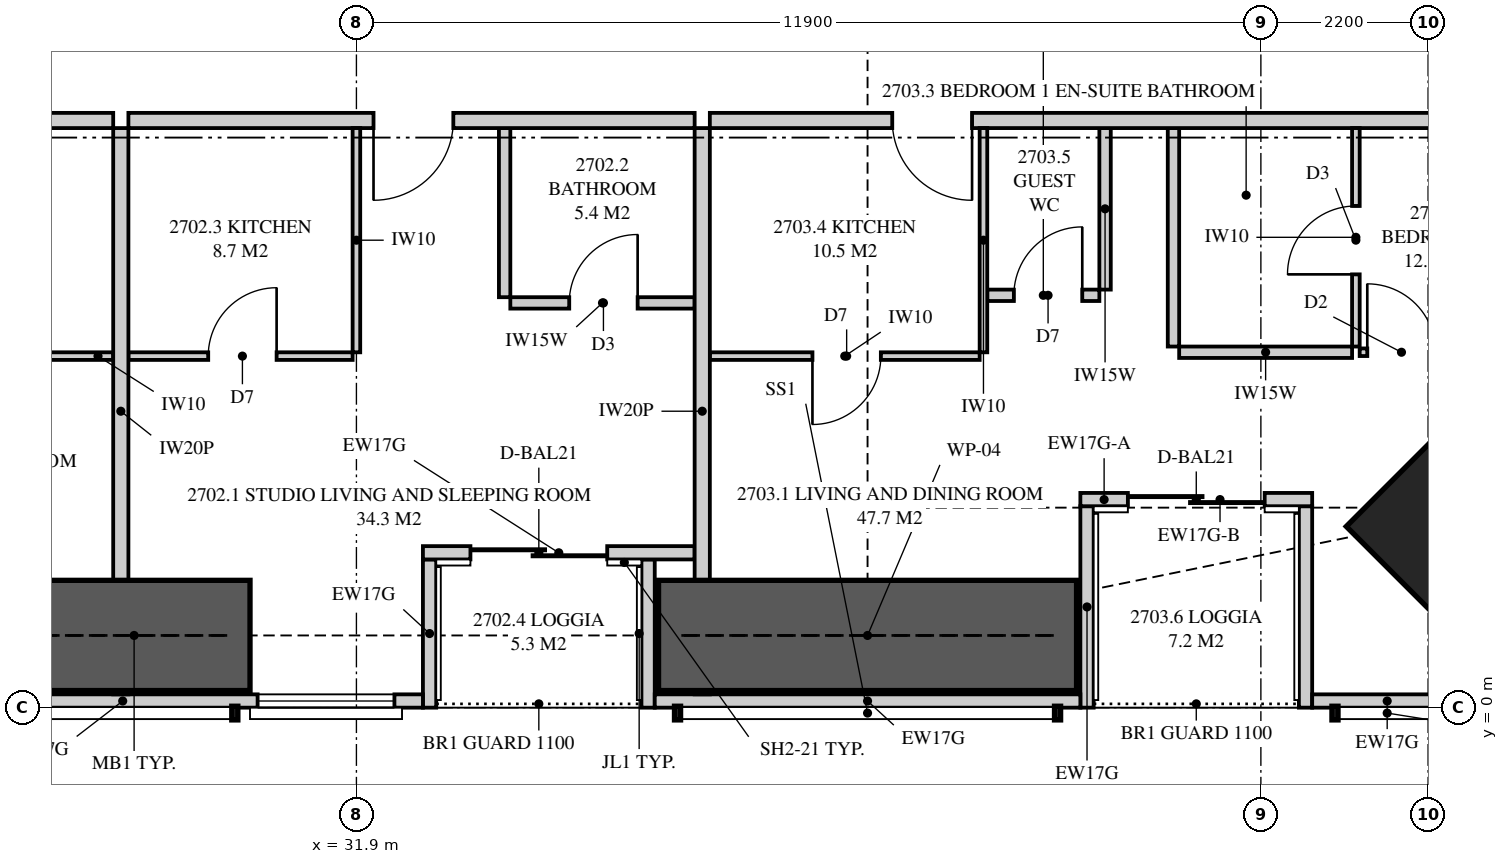
"""IFC4 building model, lengths in metres.
Left out: names, types, materials, properties, quantities, classifications, styles, units other than length and angle.
Written with IfcOpenShell. Run it as: python <this file> out.ifc"""

import sys

from ifc_helpers import new_model, si_unit, direction, frame, frame_2d, origin, origin_2d, place, context, subcontext, project, spatial, polyline, rectangle, outline, extrude, element, fill, save


model = new_model("IFC4")
c1 = context("Model", 3, precision=1e-05, world=origin(), true_north=direction((0.0, 1.0)))
c2 = subcontext(c1, "Body", "Model", "MODEL_VIEW")
j1 = project(units=[si_unit("LENGTHUNIT", "METRE"), si_unit("PLANEANGLEUNIT", "RADIAN")], contexts=[c1])
p1 = place(None, origin())
s1 = spatial("IfcSite", under=j1, at=p1, CompositionType="ELEMENT")
p2 = place(p1, origin())
s2 = spatial("IfcBuilding", under=s1, at=p2, CompositionType="ELEMENT")
p3 = place(p2, frame((0.0, 0.0, 101.5)))
s3 = spatial("IfcBuildingStorey", under=s2, at=p3, CompositionType="ELEMENT", Elevation=101.5)
p4 = place(p3, frame((46.869, 2.631, 0.0), z_axis=(0.0, 0.0, 1.0), x_axis=(-0.707106781187, 0.707106781187, 0.0)))
e1 = element("IfcColumn", 1, at=p4, inside=s3, PredefinedType="COLUMN", context=c2, shape_type="SweptSolid", body=[
    extrude(rectangle(XDim=2.4, YDim=3.1, at=origin_2d()), origin(), (0.0, 0.0, 1.0), 3.35),
])
p5 = place(p3, frame((24.875, 0.087, 0.0), z_axis=(0.0, 0.0, 1.0), x_axis=(1.0, 0.0, 0.0)))
e2 = element("IfcWall", 2, at=p5, inside=s3, PredefinedType="SOLIDWALL", context=c2, shape_type="SweptSolid", body=[
    extrude(rectangle(XDim=7.9, YDim=0.175, at=frame_2d((3.95, 0.0))), origin(), (0.0, 0.0, 1.0), 2.15),
])
p6 = place(p5, frame((5.725, 0.0, 0.4)))
e3 = element("IfcOpeningElement", 3, at=p6, cuts=e2, PredefinedType="OPENING", context=c2, shape_type="SweptSolid", body=[
    extrude(rectangle(XDim=1.8, YDim=1.7, at=frame_2d((0.9, 0.85))), frame((0.0, 0.097, 0.0), z_axis=(0.0, -1.0, 0.0), x_axis=(1.0, 0.0, 0.0)), (0.0, 0.0, 1.0), 0.195),
])
p7 = place(p3, frame((35.825, 0.087, 0.0), z_axis=(0.0, 0.0, 1.0), x_axis=(1.0, 0.0, 0.0)))
e4 = element("IfcWall", 4, at=p7, inside=s3, PredefinedType="SOLIDWALL", context=c2, shape_type="SweptSolid", body=[
    extrude(outline(polyline([(0.0, 0.0), (5.6, 0.0), (5.6, 3.11), (3.003, 3.11), (3.003, 2.15), (2.958, 2.15), (2.958, 3.11), (2.8, 3.11), (2.8, 2.15), (0.0, 2.15), (0.0, 0.0)])), frame((0.0, 0.087, 0.0), z_axis=(0.0, -1.0, 0.0), x_axis=(1.0, 0.0, 0.0)), (0.0, 0.0, 1.0), 0.175),
])
p8 = place(p3, frame((44.475, 0.087, 0.0), z_axis=(0.0, 0.0, 1.0), x_axis=(1.0, 0.0, 0.0)))
e5 = element("IfcWall", 5, at=p8, inside=s3, PredefinedType="SOLIDWALL", context=c2, shape_type="SweptSolid", body=[
    extrude(rectangle(XDim=1.974, YDim=0.175, at=frame_2d((0.987, 0.0))), origin(), (0.0, 0.0, 1.0), 3.11),
])
p9 = place(p3, frame((32.775, 2.038, 0.0), z_axis=(0.0, 0.0, 1.0), x_axis=(1.0, 0.0, 0.0)))
e6 = element("IfcWall", 6, at=p9, inside=s3, PredefinedType="SOLIDWALL", context=c2, shape_type="SweptSolid", body=[
    extrude(rectangle(XDim=3.575, YDim=0.175, at=frame_2d((1.788, 0.0))), origin(), (0.0, 0.0, 1.0), 3.11),
])
p10 = place(p9, frame((0.625, 0.0, 0.0)))
e7 = element("IfcOpeningElement", 7, at=p10, cuts=e6, PredefinedType="OPENING", context=c2, shape_type="SweptSolid", body=[
    extrude(rectangle(XDim=1.8, YDim=2.1, at=frame_2d((0.9, 1.05))), frame((0.0, 0.097, 0.0), z_axis=(0.0, -1.0, 0.0), x_axis=(1.0, 0.0, 0.0)), (0.0, 0.0, 1.0), 0.195),
])
for number, where, z_axis, x_axis in (
    (8, (32.863, 0.0, 0.0), (0.0, 0.0, 1.0), (0.0, 1.0, 0.0)),
    (9, (35.738, 0.0, 0.0), (0.0, 0.0, 1.0), (0.0, 1.0, 0.0)),
):
    element("IfcWall", number, at=place(p3, frame(where, z_axis=z_axis, x_axis=x_axis)), inside=s3, PredefinedType="SOLIDWALL", context=c2, shape_type="SweptSolid", body=[
        extrude(outline(polyline([(0.0, 0.0), (1.95, 0.0), (1.95, 3.11), (1.75, 3.11), (1.75, 2.15), (0.15, 2.15), (0.15, 3.11), (0.0, 3.11), (0.0, 0.0)])), frame((0.0, 0.087, 0.0), z_axis=(0.0, -1.0, 0.0), x_axis=(1.0, 0.0, 0.0)), (0.0, 0.0, 1.0), 0.175),
    ])
p11 = place(p3, frame((41.425, 2.738, 0.0), z_axis=(0.0, 0.0, 1.0), x_axis=(1.0, 0.0, 0.0)))
e10 = element("IfcWall", 10, at=p11, inside=s3, PredefinedType="SOLIDWALL", context=c2, shape_type="SweptSolid", body=[
    extrude(rectangle(XDim=0.625, YDim=0.175, at=frame_2d((0.312, 0.0))), origin(), (0.0, 0.0, 1.0), 2.51),
])
p12 = place(p3, frame((42.05, 2.738, 0.0), z_axis=(0.0, 0.0, 1.0), x_axis=(1.0, 0.0, 0.0)))
e11 = element("IfcWall", 11, at=p12, inside=s3, PredefinedType="SOLIDWALL", context=c2, shape_type="SweptSolid", body=[
    extrude(rectangle(XDim=2.425, YDim=0.175, at=frame_2d((1.212, 0.0))), origin(), (0.0, 0.0, 1.0), 2.15),
])
p13 = place(p12, origin())
e12 = element("IfcOpeningElement", 12, at=p13, cuts=e11, PredefinedType="OPENING", context=c2, shape_type="SweptSolid", body=[
    extrude(rectangle(XDim=1.8, YDim=2.1, at=frame_2d((0.9, 1.05))), frame((0.0, 0.097, 0.0), z_axis=(0.0, -1.0, 0.0), x_axis=(1.0, 0.0, 0.0)), (0.0, 0.0, 1.0), 0.195),
])
p14 = place(p3, frame((41.512, 0.0, 0.0), z_axis=(0.0, 0.0, 1.0), x_axis=(0.0, 1.0, 0.0)))
e13 = element("IfcWall", 13, at=p14, inside=s3, PredefinedType="SOLIDWALL", context=c2, shape_type="SweptSolid", body=[
    extrude(outline(polyline([(0.0, 0.0), (2.65, 0.0), (2.65, 2.51), (2.373, 2.51), (2.373, 2.15), (0.705, 2.15), (0.705, 3.11), (0.0, 3.11), (0.0, 0.0)])), frame((0.0, 0.087, 0.0), z_axis=(0.0, -1.0, 0.0), x_axis=(1.0, 0.0, 0.0)), (0.0, 0.0, 1.0), 0.175),
])
p15 = place(p3, frame((44.387, 0.0, 0.0), z_axis=(0.0, 0.0, 1.0), x_axis=(0.0, 1.0, 0.0)))
e14 = element("IfcWall", 14, at=p15, inside=s3, PredefinedType="SOLIDWALL", context=c2, shape_type="SweptSolid", body=[
    extrude(outline(polyline([(0.0, 0.0), (2.65, 0.0), (2.65, 2.15), (1.291, 2.15), (1.291, 3.11), (0.0, 3.11), (0.0, 0.0)])), frame((0.0, 0.087, 0.0), z_axis=(0.0, -1.0, 0.0), x_axis=(1.0, 0.0, 0.0)), (0.0, 0.0, 1.0), 0.175),
])
p16 = place(p3, frame((28.8, 0.175, 0.0), z_axis=(0.0, 0.0, 1.0), x_axis=(0.0, 1.0, 0.0)))
e15 = element("IfcWall", 15, at=p16, inside=s3, PredefinedType="PARTITIONING", context=c2, shape_type="SweptSolid", body=[
    extrude(outline(polyline([(0.529, 2.15), (0.0, 2.15), (0.0, 0.0), (0.529, 0.0), (0.529, 0.786), (1.021, 0.786), (1.021, 0.0), (7.45, 0.0), (7.45, 3.11), (1.685, 3.11), (1.685, 2.15), (1.021, 2.15), (1.021, 1.364), (0.529, 1.364), (0.529, 2.15)])), frame((0.0, 0.1, 0.0), z_axis=(0.0, -1.0, 0.0), x_axis=(1.0, 0.0, 0.0)), (0.0, 0.0, 1.0), 0.2),
])
p17 = place(p3, frame((25.15, 4.625, 0.0), z_axis=(0.0, 0.0, 1.0), x_axis=(1.0, 0.0, 0.0)))
e16 = element("IfcWall", 16, at=p17, inside=s3, PredefinedType="PARTITIONING", context=c2, shape_type="SweptSolid", body=[
    extrude(outline(polyline([(0.0, 0.0), (3.55, 0.0), (3.55, 3.11), (2.887, 3.11), (2.887, 2.541), (2.312, 2.541), (2.312, 3.11), (0.0, 3.11), (0.0, 0.0)])), frame((0.0, 0.05, 0.0), z_axis=(0.0, -1.0, 0.0), x_axis=(1.0, 0.0, 0.0)), (0.0, 0.0, 1.0), 0.1),
])
p18 = place(p17, frame((1.3, 0.0, 0.0)))
e17 = element("IfcOpeningElement", 17, at=p18, cuts=e16, PredefinedType="OPENING", context=c2, shape_type="SweptSolid", body=[
    extrude(rectangle(XDim=0.9, YDim=2.1, at=frame_2d((0.45, 1.05))), frame((0.0, 0.06, 0.0), z_axis=(0.0, -1.0, 0.0), x_axis=(1.0, 0.0, 0.0)), (0.0, 0.0, 1.0), 0.12),
])
p19 = place(p3, frame((36.45, 0.175, 0.0), z_axis=(0.0, 0.0, 1.0), x_axis=(0.0, 1.0, 0.0)))
e18 = element("IfcWall", 18, at=p19, inside=s3, PredefinedType="PARTITIONING", context=c2, shape_type="SweptSolid", body=[
    extrude(outline(polyline([(0.529, 2.15), (0.0, 2.15), (0.0, 0.0), (0.529, 0.0), (0.529, 0.017), (1.021, 0.017), (1.021, 0.0), (7.45, 0.0), (7.45, 3.11), (1.685, 3.11), (1.685, 2.15), (1.021, 2.15), (1.021, 2.133), (0.529, 2.133), (0.529, 2.15)])), frame((0.0, 0.1, 0.0), z_axis=(0.0, -1.0, 0.0), x_axis=(1.0, 0.0, 0.0)), (0.0, 0.0, 1.0), 0.2),
])
p20 = place(p3, frame((28.9, 7.725, 0.0), z_axis=(0.0, 0.0, 1.0), x_axis=(1.0, 0.0, 0.0)))
e19 = element("IfcWall", 19, at=p20, inside=s3, PredefinedType="PARTITIONING", context=c2, shape_type="SweptSolid", body=[
    extrude(rectangle(XDim=7.45, YDim=0.2, at=frame_2d((3.725, 0.0))), origin(), (0.0, 0.0, 1.0), 3.11),
])
p21 = place(p20, frame((3.225, 0.0, 0.0)))
e20 = element("IfcOpeningElement", 20, at=p21, cuts=e19, PredefinedType="OPENING", context=c2, shape_type="SweptSolid", body=[
    extrude(rectangle(XDim=1.05, YDim=2.2, at=frame_2d((0.525, 1.1))), frame((0.0, 0.11, 0.0), z_axis=(0.0, -1.0, 0.0), x_axis=(1.0, 0.0, 0.0)), (0.0, 0.0, 1.0), 0.22),
])
p22 = place(p3, frame((33.925, 5.325, 0.0), z_axis=(0.0, 0.0, 1.0), x_axis=(1.0, 0.0, 0.0)))
e21 = element("IfcWall", 21, at=p22, inside=s3, PredefinedType="PLUMBINGWALL", context=c2, shape_type="SweptSolid", body=[
    extrude(rectangle(XDim=2.425, YDim=0.15, at=frame_2d((1.212, 0.0))), origin(), (0.0, 0.0, 1.0), 3.11),
])
p23 = place(p22, frame((0.775, 0.0, 0.0)))
e22 = element("IfcOpeningElement", 22, at=p23, cuts=e21, PredefinedType="OPENING", context=c2, shape_type="SweptSolid", body=[
    extrude(rectangle(XDim=0.9, YDim=2.1, at=frame_2d((0.45, 1.05))), frame((0.0, 0.085, 0.0), z_axis=(0.0, -1.0, 0.0), x_axis=(1.0, 0.0, 0.0)), (0.0, 0.0, 1.0), 0.17),
])
p24 = place(p3, frame((33.85, 5.4, 0.0), z_axis=(0.0, 0.0, 1.0), x_axis=(0.0, 1.0, 0.0)))
e23 = element("IfcWall", 23, at=p24, inside=s3, PredefinedType="PLUMBINGWALL", context=c2, shape_type="SweptSolid", body=[
    extrude(rectangle(XDim=2.225, YDim=0.15, at=frame_2d((1.113, 0.0))), origin(), (0.0, 0.0, 1.0), 3.11),
])
p25 = place(p3, frame((28.9, 4.625, 0.0), z_axis=(0.0, 0.0, 1.0), x_axis=(1.0, 0.0, 0.0)))
e24 = element("IfcWall", 24, at=p25, inside=s3, PredefinedType="PARTITIONING", context=c2, shape_type="SweptSolid", body=[
    extrude(rectangle(XDim=2.95, YDim=0.1, at=frame_2d((1.475, 0.0))), origin(), (0.0, 0.0, 1.0), 3.11),
])
p26 = place(p25, frame((1.05, 0.0, 0.0)))
e25 = element("IfcOpeningElement", 25, at=p26, cuts=e24, PredefinedType="OPENING", context=c2, shape_type="SweptSolid", body=[
    extrude(rectangle(XDim=0.9, YDim=2.1, at=frame_2d((0.45, 1.05))), frame((0.0, 0.06, 0.0), z_axis=(0.0, -1.0, 0.0), x_axis=(1.0, 0.0, 0.0)), (0.0, 0.0, 1.0), 0.12),
])
p27 = place(p3, frame((31.9, 4.675, 0.0), z_axis=(0.0, 0.0, 1.0), x_axis=(0.0, 1.0, 0.0)))
e26 = element("IfcWall", 26, at=p27, inside=s3, PredefinedType="PARTITIONING", context=c2, shape_type="SweptSolid", body=[
    extrude(rectangle(XDim=2.95, YDim=0.1, at=frame_2d((1.475, 0.0))), origin(), (0.0, 0.0, 1.0), 3.11),
])
p28 = place(p3, frame((36.55, 7.725, 0.0), z_axis=(0.0, 0.0, 1.0), x_axis=(1.0, 0.0, 0.0)))
e27 = element("IfcWall", 27, at=p28, inside=s3, PredefinedType="PARTITIONING", context=c2, shape_type="SweptSolid", body=[
    extrude(outline(polyline([(0.0, 0.0), (9.475, 0.0), (9.475, 3.11), (2.412, 3.11), (2.412, 2.541), (1.738, 2.541), (1.738, 3.11), (0.0, 3.11), (0.0, 0.0)])), frame((0.0, 0.1, 0.0), z_axis=(0.0, -1.0, 0.0), x_axis=(1.0, 0.0, 0.0)), (0.0, 0.0, 1.0), 0.2),
])
p29 = place(p28, frame((2.4, 0.0, 0.0)))
e28 = element("IfcOpeningElement", 28, at=p29, cuts=e27, PredefinedType="OPENING", context=c2, shape_type="SweptSolid", body=[
    extrude(rectangle(XDim=1.05, YDim=2.2, at=frame_2d((0.525, 1.1))), frame((0.0, 0.11, 0.0), z_axis=(0.0, -1.0, 0.0), x_axis=(1.0, 0.0, 0.0)), (0.0, 0.0, 1.0), 0.22),
])
p30 = place(p3, frame((45.05, 4.751, 0.0), z_axis=(0.0, 0.0, 1.0), x_axis=(0.0, 1.0, 0.0)))
e29 = element("IfcWall", 29, at=p30, inside=s3, PredefinedType="PARTITIONING", context=c2, shape_type="SweptSolid", body=[
    extrude(rectangle(XDim=2.874, YDim=0.1, at=frame_2d((1.437, 0.0))), origin(), (0.0, 0.0, 1.0), 3.11),
])
p31 = place(p30, frame((0.949, 0.0, 0.0)))
e30 = element("IfcOpeningElement", 30, at=p31, cuts=e29, PredefinedType="OPENING", context=c2, shape_type="SweptSolid", body=[
    extrude(rectangle(XDim=0.9, YDim=2.1, at=frame_2d((0.45, 1.05))), frame((0.0, 0.06, 0.0), z_axis=(0.0, -1.0, 0.0), x_axis=(1.0, 0.0, 0.0)), (0.0, 0.0, 1.0), 0.12),
])
p32 = place(p3, frame((45.1, 4.676, 0.0), z_axis=(0.0, 0.0, 1.0), x_axis=(1.0, 0.0, 0.0)))
e31 = element("IfcWall", 31, at=p32, inside=s3, PredefinedType="PARTITIONING", context=c2, shape_type="SweptSolid", body=[
    extrude(outline(polyline([(0.0, 0.0), (4.4, 0.0), (4.4, 3.11), (2.971, 3.11), (2.971, 2.15), (1.229, 2.15), (1.229, 3.11), (0.0, 3.11), (0.0, 0.0)])), frame((0.0, 0.05, 0.0), z_axis=(0.0, -1.0, 0.0), x_axis=(1.0, 0.0, 0.0)), (0.0, 0.0, 1.0), 0.1),
])
p33 = place(p32, frame((0.1, 0.0, 0.0)))
e32 = element("IfcOpeningElement", 32, at=p33, cuts=e31, PredefinedType="OPENING", context=c2, shape_type="SweptSolid", body=[
    extrude(rectangle(XDim=0.9, YDim=2.1, at=frame_2d((0.45, 1.05))), frame((0.0, 0.06, 0.0), z_axis=(0.0, -1.0, 0.0), x_axis=(1.0, 0.0, 0.0)), (0.0, 0.0, 1.0), 0.12),
])
p34 = place(p3, frame((42.725, 4.676, 0.0), z_axis=(0.0, 0.0, 1.0), x_axis=(1.0, 0.0, 0.0)))
e33 = element("IfcWall", 33, at=p34, inside=s3, PredefinedType="PLUMBINGWALL", context=c2, shape_type="SweptSolid", body=[
    extrude(rectangle(XDim=2.275, YDim=0.15, at=frame_2d((1.137, 0.0))), origin(), (0.0, 0.0, 1.0), 3.11),
])
p35 = place(p3, frame((42.65, 4.751, 0.0), z_axis=(0.0, 0.0, 1.0), x_axis=(0.0, 1.0, 0.0)))
e34 = element("IfcWall", 34, at=p35, inside=s3, PredefinedType="PLUMBINGWALL", context=c2, shape_type="SweptSolid", body=[
    extrude(rectangle(XDim=2.874, YDim=0.15, at=frame_2d((1.437, 0.0))), origin(), (0.0, 0.0, 1.0), 3.11),
])
p36 = place(p3, frame((36.55, 4.625, 0.0), z_axis=(0.0, 0.0, 1.0), x_axis=(1.0, 0.0, 0.0)))
e35 = element("IfcWall", 35, at=p36, inside=s3, PredefinedType="PARTITIONING", context=c2, shape_type="SweptSolid", body=[
    extrude(outline(polyline([(0.0, 0.0), (3.55, 0.0), (3.55, 3.11), (2.362, 3.11), (2.362, 2.541), (1.788, 2.541), (1.788, 3.11), (0.0, 3.11), (0.0, 0.0)])), frame((0.0, 0.05, 0.0), z_axis=(0.0, -1.0, 0.0), x_axis=(1.0, 0.0, 0.0)), (0.0, 0.0, 1.0), 0.1),
])
p37 = place(p36, frame((1.35, 0.0, 0.0)))
e36 = element("IfcOpeningElement", 36, at=p37, cuts=e35, PredefinedType="OPENING", context=c2, shape_type="SweptSolid", body=[
    extrude(rectangle(XDim=0.9, YDim=2.1, at=frame_2d((0.45, 1.05))), frame((0.0, 0.06, 0.0), z_axis=(0.0, -1.0, 0.0), x_axis=(1.0, 0.0, 0.0)), (0.0, 0.0, 1.0), 0.12),
])
p38 = place(p3, frame((40.15, 4.675, 0.0), z_axis=(0.0, 0.0, 1.0), x_axis=(0.0, 1.0, 0.0)))
e37 = element("IfcWall", 37, at=p38, inside=s3, PredefinedType="PARTITIONING", context=c2, shape_type="SweptSolid", body=[
    extrude(rectangle(XDim=2.95, YDim=0.1, at=frame_2d((1.475, 0.0))), origin(), (0.0, 0.0, 1.0), 3.11),
])
p39 = place(p3, frame((40.2, 5.425, 0.0), z_axis=(0.0, 0.0, 1.0), x_axis=(1.0, 0.0, 0.0)))
e38 = element("IfcWall", 38, at=p39, inside=s3, PredefinedType="PLUMBINGWALL", context=c2, shape_type="SweptSolid", body=[
    extrude(rectangle(XDim=1.475, YDim=0.15, at=frame_2d((0.738, 0.0))), origin(), (0.0, 0.0, 1.0), 3.11),
])
p40 = place(p39, frame((0.35, 0.0, 0.0)))
e39 = element("IfcOpeningElement", 39, at=p40, cuts=e38, PredefinedType="OPENING", context=c2, shape_type="SweptSolid", body=[
    extrude(rectangle(XDim=0.9, YDim=2.1, at=frame_2d((0.45, 1.05))), frame((0.0, 0.085, 0.0), z_axis=(0.0, -1.0, 0.0), x_axis=(1.0, 0.0, 0.0)), (0.0, 0.0, 1.0), 0.17),
])
p41 = place(p3, frame((41.75, 5.5, 0.0), z_axis=(0.0, 0.0, 1.0), x_axis=(0.0, 1.0, 0.0)))
e40 = element("IfcWall", 40, at=p41, inside=s3, PredefinedType="PLUMBINGWALL", context=c2, shape_type="SweptSolid", body=[
    extrude(rectangle(XDim=2.125, YDim=0.15, at=frame_2d((1.062, 0.0))), origin(), (0.0, 0.0, 1.0), 3.11),
])
p42 = place(p3, frame((24.9, 7.725, 0.0), z_axis=(0.0, 0.0, 1.0), x_axis=(1.0, 0.0, 0.0)))
e41 = element("IfcWall", 41, at=p42, inside=s3, PredefinedType="PARTITIONING", context=c2, shape_type="SweptSolid", body=[
    extrude(outline(polyline([(0.0, 0.0), (3.8, 0.0), (3.8, 3.11), (3.187, 3.11), (3.187, 2.541), (2.513, 2.541), (2.513, 3.11), (0.0, 3.11), (0.0, 0.0)])), frame((0.0, 0.1, 0.0), z_axis=(0.0, -1.0, 0.0), x_axis=(1.0, 0.0, 0.0)), (0.0, 0.0, 1.0), 0.2),
])
for number, where, z_axis, x_axis in (
    (42, (25.0, 0.95, 0.0), (0.0, 0.0, 1.0), (1.0, 0.0, 0.0)),
    (43, (35.875, 0.95, 0.0), (0.0, 0.0, 1.0), (1.0, 0.0, 0.0)),
):
    element("IfcWall", number, at=place(p3, frame(where, z_axis=z_axis, x_axis=x_axis)), inside=s3, PredefinedType="SHEAR", context=c2, shape_type="SweptSolid", body=[
        extrude(rectangle(XDim=5.5, YDim=1.45, at=frame_2d((2.75, 0.0))), origin(), (0.0, 0.0, 1.0), 3.35),
    ])
p43 = place(p10, origin())
e44 = element("IfcDoor", 44, at=p43, inside=s3, OperationType="SLIDING_TO_LEFT", PredefinedType="DOOR", context=c2, shape_type="SweptSolid", body=[
    extrude(rectangle(XDim=1.8, YDim=2.1, at=frame_2d((0.9, 1.05))), frame((0.0, 0.025, 0.0), z_axis=(0.0, -1.0, 0.0), x_axis=(1.0, 0.0, 0.0)), (0.0, 0.0, 1.0), 0.05),
])
fill(e7, e44)
p44 = place(p6, origin())
e45 = element("IfcWindow", 45, at=p44, inside=s3, PartitioningType="SINGLE_PANEL", PredefinedType="WINDOW", context=c2, shape_type="SweptSolid", body=[
    extrude(rectangle(XDim=1.8, YDim=1.7, at=frame_2d((0.9, 0.85))), frame((0.0, 0.03, 0.0), z_axis=(0.0, -1.0, 0.0), x_axis=(1.0, 0.0, 0.0)), (0.0, 0.0, 1.0), 0.06),
])
fill(e3, e45)
p45 = place(p13, origin())
e46 = element("IfcDoor", 46, at=p45, inside=s3, OperationType="SLIDING_TO_LEFT", PredefinedType="DOOR", context=c2, shape_type="SweptSolid", body=[
    extrude(rectangle(XDim=1.8, YDim=2.1, at=frame_2d((0.9, 1.05))), frame((0.0, 0.025, 0.0), z_axis=(0.0, -1.0, 0.0), x_axis=(1.0, 0.0, 0.0)), (0.0, 0.0, 1.0), 0.05),
])
fill(e12, e46)
p46 = place(p21, frame((1.05, 0.0, 0.0), z_axis=(0.0, 0.0, 1.0), x_axis=(-1.0, 0.0, 0.0)))
e47 = element("IfcDoor", 47, at=p46, inside=s3, OperationType="SINGLE_SWING_RIGHT", PredefinedType="DOOR", context=c2, shape_type="SweptSolid", body=[
    extrude(rectangle(XDim=1.05, YDim=2.2, at=frame_2d((0.525, 1.1))), frame((0.0, 0.025, 0.0), z_axis=(0.0, -1.0, 0.0), x_axis=(1.0, 0.0, 0.0)), (0.0, 0.0, 1.0), 0.05),
])
fill(e20, e47)
p47 = place(p23, origin())
e48 = element("IfcDoor", 48, at=p47, inside=s3, OperationType="SINGLE_SWING_RIGHT", PredefinedType="DOOR", context=c2, shape_type="SweptSolid", body=[
    extrude(rectangle(XDim=0.9, YDim=2.1, at=frame_2d((0.45, 1.05))), frame((0.0, 0.025, 0.0), z_axis=(0.0, -1.0, 0.0), x_axis=(1.0, 0.0, 0.0)), (0.0, 0.0, 1.0), 0.05),
])
fill(e22, e48)
p48 = place(p26, origin())
e49 = element("IfcDoor", 49, at=p48, inside=s3, OperationType="SINGLE_SWING_RIGHT", PredefinedType="DOOR", context=c2, shape_type="SweptSolid", body=[
    extrude(rectangle(XDim=0.9, YDim=2.1, at=frame_2d((0.45, 1.05))), frame((0.0, 0.025, 0.0), z_axis=(0.0, -1.0, 0.0), x_axis=(1.0, 0.0, 0.0)), (0.0, 0.0, 1.0), 0.05),
])
fill(e25, e49)
p49 = place(p29, frame((1.05, 0.0, 0.0), z_axis=(0.0, 0.0, 1.0), x_axis=(-1.0, 0.0, 0.0)))
e50 = element("IfcDoor", 50, at=p49, inside=s3, OperationType="SINGLE_SWING_LEFT", PredefinedType="DOOR", context=c2, shape_type="SweptSolid", body=[
    extrude(rectangle(XDim=1.05, YDim=2.2, at=frame_2d((0.525, 1.1))), frame((0.0, 0.025, 0.0), z_axis=(0.0, -1.0, 0.0), x_axis=(1.0, 0.0, 0.0)), (0.0, 0.0, 1.0), 0.05),
])
fill(e28, e50)
p50 = place(p33, origin())
e51 = element("IfcDoor", 51, at=p50, inside=s3, OperationType="SINGLE_SWING_LEFT", PredefinedType="DOOR", context=c2, shape_type="SweptSolid", body=[
    extrude(rectangle(XDim=0.9, YDim=2.1, at=frame_2d((0.45, 1.05))), frame((0.0, 0.025, 0.0), z_axis=(0.0, -1.0, 0.0), x_axis=(1.0, 0.0, 0.0)), (0.0, 0.0, 1.0), 0.05),
])
fill(e32, e51)
p51 = place(p31, origin())
e52 = element("IfcDoor", 52, at=p51, inside=s3, OperationType="SINGLE_SWING_LEFT", PredefinedType="DOOR", context=c2, shape_type="SweptSolid", body=[
    extrude(rectangle(XDim=0.9, YDim=2.1, at=frame_2d((0.45, 1.05))), frame((0.0, 0.025, 0.0), z_axis=(0.0, -1.0, 0.0), x_axis=(1.0, 0.0, 0.0)), (0.0, 0.0, 1.0), 0.05),
])
fill(e30, e52)
p52 = place(p37, frame((0.9, 0.0, 0.0), z_axis=(0.0, 0.0, 1.0), x_axis=(-1.0, 0.0, 0.0)))
e53 = element("IfcDoor", 53, at=p52, inside=s3, OperationType="SINGLE_SWING_RIGHT", PredefinedType="DOOR", context=c2, shape_type="SweptSolid", body=[
    extrude(rectangle(XDim=0.9, YDim=2.1, at=frame_2d((0.45, 1.05))), frame((0.0, 0.025, 0.0), z_axis=(0.0, -1.0, 0.0), x_axis=(1.0, 0.0, 0.0)), (0.0, 0.0, 1.0), 0.05),
])
fill(e36, e53)
p53 = place(p40, origin())
e54 = element("IfcDoor", 54, at=p53, inside=s3, OperationType="SINGLE_SWING_RIGHT", PredefinedType="DOOR", context=c2, shape_type="SweptSolid", body=[
    extrude(rectangle(XDim=0.9, YDim=2.1, at=frame_2d((0.45, 1.05))), frame((0.0, 0.025, 0.0), z_axis=(0.0, -1.0, 0.0), x_axis=(1.0, 0.0, 0.0)), (0.0, 0.0, 1.0), 0.05),
])
fill(e39, e54)
save(model, sys.argv[1])
